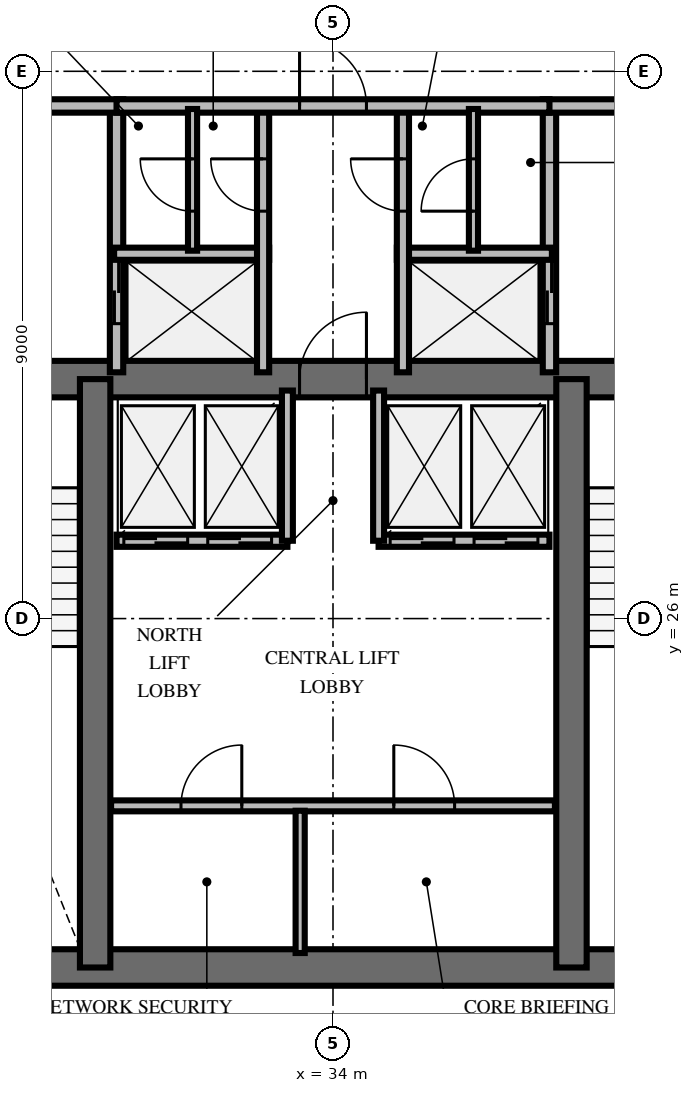
"""IFC4 building model, lengths in metres.
Left out: names, types, materials, properties, quantities, classifications, styles, units other than length and angle.
Written with IfcOpenShell. Run it as: python <this file> out.ifc"""

import sys

from ifc_helpers import new_model, si_unit, direction, frame, frame_2d, origin, place, context, subcontext, project, spatial, rectangle, extrude, element, fill, save


model = new_model("IFC4")
c1 = context("Model", 3, precision=1e-05, world=origin(), true_north=direction((0.0, 1.0)))
c2 = subcontext(c1, "Body", "Model", "MODEL_VIEW")
j1 = project(units=[si_unit("LENGTHUNIT", "METRE"), si_unit("PLANEANGLEUNIT", "RADIAN")], contexts=[c1])
p1 = place(None, origin())
s1 = spatial("IfcSite", under=j1, at=p1, CompositionType="ELEMENT")
p2 = place(p1, origin())
s2 = spatial("IfcBuilding", under=s1, at=p2, CompositionType="ELEMENT")
p3 = place(p2, frame((0.0, 0.0, 248.4)))
s3 = spatial("IfcBuildingStorey", under=s2, at=p3, CompositionType="ELEMENT", Elevation=248.4)
p4 = place(p3, frame((26.222, 20.262, 0.0), z_axis=(0.0, 0.0, 1.0), x_axis=(1.0, 0.0, 0.0)))
e1 = element("IfcWall", 1, at=p4, inside=s3, PredefinedType="SHEAR", context=c2, shape_type="SweptSolid", body=[
    extrude(rectangle(XDim=15.566, YDim=0.6, at=frame_2d((7.783, 0.0))), origin(), (0.0, 0.0, 1.0), 3.6),
])
p5 = place(p3, frame((26.222, 29.938, 0.0), z_axis=(0.0, 0.0, 1.0), x_axis=(1.0, 0.0, 0.0)))
e2 = element("IfcWall", 2, at=p5, inside=s3, PredefinedType="SHEAR", context=c2, shape_type="SweptSolid", body=[
    extrude(rectangle(XDim=15.566, YDim=0.6, at=frame_2d((7.783, 0.0))), origin(), (0.0, 0.0, 1.0), 3.6),
])
p6 = place(p5, frame((0.728, 0.0, 0.0)))
e3 = element("IfcOpeningElement", 3, at=p6, cuts=e2, PredefinedType="OPENING", context=c2, shape_type="SweptSolid", body=[
    extrude(rectangle(XDim=1.05, YDim=2.15, at=frame_2d((0.525, 1.075))), frame((0.0, 0.31, 0.0), z_axis=(0.0, -1.0, 0.0), x_axis=(1.0, 0.0, 0.0)), (0.0, 0.0, 1.0), 0.62),
])
p7 = place(p5, frame((13.778, 0.0, 0.0)))
e4 = element("IfcOpeningElement", 4, at=p7, cuts=e2, PredefinedType="OPENING", context=c2, shape_type="SweptSolid", body=[
    extrude(rectangle(XDim=1.05, YDim=2.15, at=frame_2d((0.525, 1.075))), frame((0.0, 0.31, 0.0), z_axis=(0.0, -1.0, 0.0), x_axis=(1.0, 0.0, 0.0)), (0.0, 0.0, 1.0), 0.62),
])
p8 = place(p5, frame((7.228, 0.0, 0.0)))
e5 = element("IfcOpeningElement", 5, at=p8, cuts=e2, PredefinedType="OPENING", context=c2, shape_type="SweptSolid", body=[
    extrude(rectangle(XDim=1.1, YDim=2.15, at=frame_2d((0.55, 1.075))), frame((0.0, 0.31, 0.0), z_axis=(0.0, -1.0, 0.0), x_axis=(1.0, 0.0, 0.0)), (0.0, 0.0, 1.0), 0.62),
])
for number, where, z_axis, x_axis in (
    (6, (30.088, 20.262, 0.0), (0.0, 0.0, 1.0), (0.0, 1.0, 0.0)),
    (7, (37.922, 20.262, 0.0), (0.0, 0.0, 1.0), (0.0, 1.0, 0.0)),
):
    element("IfcWall", number, at=place(p3, frame(where, z_axis=z_axis, x_axis=x_axis)), inside=s3, PredefinedType="SHEAR", context=c2, shape_type="SweptSolid", body=[
        extrude(rectangle(XDim=9.676, YDim=0.5, at=frame_2d((4.838, 0.0))), origin(), (0.0, 0.0, 1.0), 3.6),
    ])
p9 = place(p3, frame((30.44, 30.05, 0.0), z_axis=(0.0, 0.0, 1.0), x_axis=(0.0, 1.0, 0.0)))
e8 = element("IfcWall", 8, at=p9, inside=s3, PredefinedType="SOLIDWALL", context=c2, shape_type="SweptSolid", body=[
    extrude(rectangle(XDim=4.38, YDim=0.22, at=frame_2d((2.19, 0.0))), origin(), (0.0, 0.0, 1.0), 2.46),
])
p10 = place(p9, frame((0.8, 0.0, 0.0)))
e9 = element("IfcOpeningElement", 9, at=p10, cuts=e8, PredefinedType="OPENING", context=c2, shape_type="SweptSolid", body=[
    extrude(rectangle(XDim=1.05, YDim=2.1, at=frame_2d((0.525, 1.05))), frame((0.0, 0.12, 0.0), z_axis=(0.0, -1.0, 0.0), x_axis=(1.0, 0.0, 0.0)), (0.0, 0.0, 1.0), 0.24),
])
p11 = place(p3, frame((26.24, 34.43, 0.0), z_axis=(0.0, 0.0, 1.0), x_axis=(1.0, 0.0, 0.0)))
e10 = element("IfcWall", 10, at=p11, inside=s3, PredefinedType="SOLIDWALL", context=c2, shape_type="SweptSolid", body=[
    extrude(rectangle(XDim=4.31, YDim=0.22, at=frame_2d((2.155, 0.0))), origin(), (0.0, 0.0, 1.0), 2.46),
])
p12 = place(p11, frame((1.6, 0.0, 0.0)))
e11 = element("IfcOpeningElement", 11, at=p12, cuts=e10, PredefinedType="OPENING", context=c2, shape_type="SweptSolid", body=[
    extrude(rectangle(XDim=1.1, YDim=2.15, at=frame_2d((0.55, 1.075))), frame((0.0, 0.12, 0.0), z_axis=(0.0, -1.0, 0.0), x_axis=(1.0, 0.0, 0.0)), (0.0, 0.0, 1.0), 0.24),
])
p13 = place(p3, frame((30.4, 32.0, 0.0), z_axis=(0.0, 0.0, 1.0), x_axis=(1.0, 0.0, 0.0)))
e12 = element("IfcWall", 12, at=p13, inside=s3, PredefinedType="SOLIDWALL", context=c2, shape_type="SweptSolid", body=[
    extrude(rectangle(XDim=2.55, YDim=0.2, at=frame_2d((1.275, 0.0))), origin(), (0.0, 0.0, 1.0), 2.46),
])
p14 = place(p3, frame((32.85, 30.05, 0.0), z_axis=(0.0, 0.0, 1.0), x_axis=(0.0, 1.0, 0.0)))
e13 = element("IfcWall", 13, at=p14, inside=s3, PredefinedType="SOLIDWALL", context=c2, shape_type="SweptSolid", body=[
    extrude(rectangle(XDim=4.38, YDim=0.2, at=frame_2d((2.19, 0.0))), origin(), (0.0, 0.0, 1.0), 2.46),
])
p15 = place(p14, frame((2.65, 0.0, 0.0)))
e14 = element("IfcOpeningElement", 14, at=p15, cuts=e13, PredefinedType="OPENING", context=c2, shape_type="SweptSolid", body=[
    extrude(rectangle(XDim=0.86, YDim=2.05, at=frame_2d((0.43, 1.025))), frame((0.0, 0.11, 0.0), z_axis=(0.0, -1.0, 0.0), x_axis=(1.0, 0.0, 0.0)), (0.0, 0.0, 1.0), 0.22),
])
p16 = place(p3, frame((37.56, 30.05, 0.0), z_axis=(0.0, 0.0, 1.0), x_axis=(0.0, 1.0, 0.0)))
e15 = element("IfcWall", 15, at=p16, inside=s3, PredefinedType="SOLIDWALL", context=c2, shape_type="SweptSolid", body=[
    extrude(rectangle(XDim=4.38, YDim=0.22, at=frame_2d((2.19, 0.0))), origin(), (0.0, 0.0, 1.0), 2.46),
])
p17 = place(p16, frame((0.8, 0.0, 0.0)))
e16 = element("IfcOpeningElement", 16, at=p17, cuts=e15, PredefinedType="OPENING", context=c2, shape_type="SweptSolid", body=[
    extrude(rectangle(XDim=1.05, YDim=2.1, at=frame_2d((0.525, 1.05))), frame((0.0, 0.12, 0.0), z_axis=(0.0, -1.0, 0.0), x_axis=(1.0, 0.0, 0.0)), (0.0, 0.0, 1.0), 0.24),
])
p18 = place(p3, frame((37.45, 34.43, 0.0), z_axis=(0.0, 0.0, 1.0), x_axis=(1.0, 0.0, 0.0)))
e17 = element("IfcWall", 17, at=p18, inside=s3, PredefinedType="SOLIDWALL", context=c2, shape_type="SweptSolid", body=[
    extrude(rectangle(XDim=4.31, YDim=0.22, at=frame_2d((2.155, 0.0))), origin(), (0.0, 0.0, 1.0), 2.46),
])
p19 = place(p18, frame((1.6, 0.0, 0.0)))
e18 = element("IfcOpeningElement", 18, at=p19, cuts=e17, PredefinedType="OPENING", context=c2, shape_type="SweptSolid", body=[
    extrude(rectangle(XDim=1.1, YDim=2.15, at=frame_2d((0.55, 1.075))), frame((0.0, 0.12, 0.0), z_axis=(0.0, -1.0, 0.0), x_axis=(1.0, 0.0, 0.0)), (0.0, 0.0, 1.0), 0.24),
])
p20 = place(p3, frame((35.05, 32.0, 0.0), z_axis=(0.0, 0.0, 1.0), x_axis=(1.0, 0.0, 0.0)))
e19 = element("IfcWall", 19, at=p20, inside=s3, PredefinedType="SOLIDWALL", context=c2, shape_type="SweptSolid", body=[
    extrude(rectangle(XDim=2.55, YDim=0.2, at=frame_2d((1.275, 0.0))), origin(), (0.0, 0.0, 1.0), 2.46),
])
p21 = place(p3, frame((35.15, 30.05, 0.0), z_axis=(0.0, 0.0, 1.0), x_axis=(0.0, 1.0, 0.0)))
e20 = element("IfcWall", 20, at=p21, inside=s3, PredefinedType="SOLIDWALL", context=c2, shape_type="SweptSolid", body=[
    extrude(rectangle(XDim=4.38, YDim=0.2, at=frame_2d((2.19, 0.0))), origin(), (0.0, 0.0, 1.0), 2.46),
])
p22 = place(p21, frame((2.65, 0.0, 0.0)))
e21 = element("IfcOpeningElement", 21, at=p22, cuts=e20, PredefinedType="OPENING", context=c2, shape_type="SweptSolid", body=[
    extrude(rectangle(XDim=0.86, YDim=2.05, at=frame_2d((0.43, 1.025))), frame((0.0, 0.11, 0.0), z_axis=(0.0, -1.0, 0.0), x_axis=(1.0, 0.0, 0.0)), (0.0, 0.0, 1.0), 0.22),
])
p23 = place(p3, frame((30.44, 34.43, 0.0), z_axis=(0.0, 0.0, 1.0), x_axis=(1.0, 0.0, 0.0)))
e22 = element("IfcWall", 22, at=p23, inside=s3, PredefinedType="SOLIDWALL", context=c2, shape_type="SweptSolid", body=[
    extrude(rectangle(XDim=7.12, YDim=0.22, at=frame_2d((3.56, 0.0))), origin(), (0.0, 0.0, 1.0), 2.46),
])
p24 = place(p23, frame((3.01, 0.0, 0.0)))
e23 = element("IfcOpeningElement", 23, at=p24, cuts=e22, PredefinedType="OPENING", context=c2, shape_type="SweptSolid", body=[
    extrude(rectangle(XDim=1.1, YDim=2.15, at=frame_2d((0.55, 1.075))), frame((0.0, 0.12, 0.0), z_axis=(0.0, -1.0, 0.0), x_axis=(1.0, 0.0, 0.0)), (0.0, 0.0, 1.0), 0.24),
])
p25 = place(p3, frame((31.69, 32.05, 0.0), z_axis=(0.0, 0.0, 1.0), x_axis=(0.0, 1.0, 0.0)))
e24 = element("IfcWall", 24, at=p25, inside=s3, PredefinedType="PARTITIONING", context=c2, shape_type="SweptSolid", body=[
    extrude(rectangle(XDim=2.33, YDim=0.15, at=frame_2d((1.165, 0.0))), origin(), (0.0, 0.0, 1.0), 2.46),
])
p26 = place(p25, frame((0.65, 0.0, 0.0)))
e25 = element("IfcOpeningElement", 25, at=p26, cuts=e24, PredefinedType="OPENING", context=c2, shape_type="SweptSolid", body=[
    extrude(rectangle(XDim=0.86, YDim=2.05, at=frame_2d((0.43, 1.025))), frame((0.0, 0.085, 0.0), z_axis=(0.0, -1.0, 0.0), x_axis=(1.0, 0.0, 0.0)), (0.0, 0.0, 1.0), 0.17),
])
p27 = place(p3, frame((36.31, 32.05, 0.0), z_axis=(0.0, 0.0, 1.0), x_axis=(0.0, 1.0, 0.0)))
e26 = element("IfcWall", 26, at=p27, inside=s3, PredefinedType="PARTITIONING", context=c2, shape_type="SweptSolid", body=[
    extrude(rectangle(XDim=2.33, YDim=0.15, at=frame_2d((1.165, 0.0))), origin(), (0.0, 0.0, 1.0), 2.46),
])
p28 = place(p27, frame((0.65, 0.0, 0.0)))
e27 = element("IfcOpeningElement", 27, at=p28, cuts=e26, PredefinedType="OPENING", context=c2, shape_type="SweptSolid", body=[
    extrude(rectangle(XDim=0.86, YDim=2.05, at=frame_2d((0.43, 1.025))), frame((0.0, 0.085, 0.0), z_axis=(0.0, -1.0, 0.0), x_axis=(1.0, 0.0, 0.0)), (0.0, 0.0, 1.0), 0.17),
])
p29 = place(p3, frame((30.35, 22.92, 0.0), z_axis=(0.0, 0.0, 1.0), x_axis=(1.0, 0.0, 0.0)))
e28 = element("IfcWall", 28, at=p29, inside=s3, PredefinedType="PARTITIONING", context=c2, shape_type="SweptSolid", body=[
    extrude(rectangle(XDim=7.3, YDim=0.18, at=frame_2d((3.65, 0.0))), origin(), (0.0, 0.0, 1.0), 2.46),
])
p30 = place(p29, frame((1.15, 0.0, 0.0)))
e29 = element("IfcOpeningElement", 29, at=p30, cuts=e28, PredefinedType="OPENING", context=c2, shape_type="SweptSolid", body=[
    extrude(rectangle(XDim=1.0, YDim=2.15, at=frame_2d((0.5, 1.075))), frame((0.0, 0.1, 0.0), z_axis=(0.0, -1.0, 0.0), x_axis=(1.0, 0.0, 0.0)), (0.0, 0.0, 1.0), 0.2),
])
p31 = place(p29, frame((4.65, 0.0, 0.0)))
e30 = element("IfcOpeningElement", 30, at=p31, cuts=e28, PredefinedType="OPENING", context=c2, shape_type="SweptSolid", body=[
    extrude(rectangle(XDim=1.0, YDim=2.15, at=frame_2d((0.5, 1.075))), frame((0.0, 0.1, 0.0), z_axis=(0.0, -1.0, 0.0), x_axis=(1.0, 0.0, 0.0)), (0.0, 0.0, 1.0), 0.2),
])
p32 = place(p3, frame((33.46, 20.5, 0.0), z_axis=(0.0, 0.0, 1.0), x_axis=(0.0, 1.0, 0.0)))
e31 = element("IfcWall", 31, at=p32, inside=s3, PredefinedType="PARTITIONING", context=c2, shape_type="SweptSolid", body=[
    extrude(rectangle(XDim=2.34, YDim=0.15, at=frame_2d((1.17, 0.0))), origin(), (0.0, 0.0, 1.0), 2.46),
])
p33 = place(p3, frame((30.44, 27.28, 0.0), z_axis=(0.0, 0.0, 1.0), x_axis=(1.0, 0.0, 0.0)))
e32 = element("IfcWall", 32, at=p33, inside=s3, PredefinedType="SOLIDWALL", context=c2, shape_type="SweptSolid", body=[
    extrude(rectangle(XDim=2.81, YDim=0.2, at=frame_2d((1.405, 0.0))), origin(), (0.0, 0.0, 1.0), 2.46),
])
p34 = place(p33, frame((0.12, 0.0, 0.0)))
e33 = element("IfcOpeningElement", 33, at=p34, cuts=e32, PredefinedType="OPENING", context=c2, shape_type="SweptSolid", body=[
    extrude(rectangle(XDim=1.05, YDim=2.1, at=frame_2d((0.525, 1.05))), frame((0.0, 0.11, 0.0), z_axis=(0.0, -1.0, 0.0), x_axis=(1.0, 0.0, 0.0)), (0.0, 0.0, 1.0), 0.22),
])
p35 = place(p33, frame((1.5, 0.0, 0.0)))
e34 = element("IfcOpeningElement", 34, at=p35, cuts=e32, PredefinedType="OPENING", context=c2, shape_type="SweptSolid", body=[
    extrude(rectangle(XDim=1.05, YDim=2.1, at=frame_2d((0.525, 1.05))), frame((0.0, 0.11, 0.0), z_axis=(0.0, -1.0, 0.0), x_axis=(1.0, 0.0, 0.0)), (0.0, 0.0, 1.0), 0.22),
])
p36 = place(p3, frame((33.25, 27.28, 0.0), z_axis=(0.0, 0.0, 1.0), x_axis=(0.0, 1.0, 0.0)))
e35 = element("IfcWall", 35, at=p36, inside=s3, PredefinedType="SOLIDWALL", context=c2, shape_type="SweptSolid", body=[
    extrude(rectangle(XDim=2.47, YDim=0.18, at=frame_2d((1.235, 0.0))), origin(), (0.0, 0.0, 1.0), 2.46),
])
p37 = place(p3, frame((34.75, 27.28, 0.0), z_axis=(0.0, 0.0, 1.0), x_axis=(1.0, 0.0, 0.0)))
e36 = element("IfcWall", 36, at=p37, inside=s3, PredefinedType="SOLIDWALL", context=c2, shape_type="SweptSolid", body=[
    extrude(rectangle(XDim=2.81, YDim=0.2, at=frame_2d((1.405, 0.0))), origin(), (0.0, 0.0, 1.0), 2.46),
])
p38 = place(p37, frame((0.19, 0.0, 0.0)))
e37 = element("IfcOpeningElement", 37, at=p38, cuts=e36, PredefinedType="OPENING", context=c2, shape_type="SweptSolid", body=[
    extrude(rectangle(XDim=1.05, YDim=2.1, at=frame_2d((0.525, 1.05))), frame((0.0, 0.11, 0.0), z_axis=(0.0, -1.0, 0.0), x_axis=(1.0, 0.0, 0.0)), (0.0, 0.0, 1.0), 0.22),
])
p39 = place(p37, frame((1.57, 0.0, 0.0)))
e38 = element("IfcOpeningElement", 38, at=p39, cuts=e36, PredefinedType="OPENING", context=c2, shape_type="SweptSolid", body=[
    extrude(rectangle(XDim=1.05, YDim=2.1, at=frame_2d((0.525, 1.05))), frame((0.0, 0.11, 0.0), z_axis=(0.0, -1.0, 0.0), x_axis=(1.0, 0.0, 0.0)), (0.0, 0.0, 1.0), 0.22),
])
p40 = place(p3, frame((34.75, 27.28, 0.0), z_axis=(0.0, 0.0, 1.0), x_axis=(0.0, 1.0, 0.0)))
e39 = element("IfcWall", 39, at=p40, inside=s3, PredefinedType="SOLIDWALL", context=c2, shape_type="SweptSolid", body=[
    extrude(rectangle(XDim=2.47, YDim=0.18, at=frame_2d((1.235, 0.0))), origin(), (0.0, 0.0, 1.0), 2.46),
])
p41 = place(p3, frame((27.5, 35.219, 0.0), z_axis=(0.0, 0.0, 1.0), x_axis=(0.953228121756, 0.302251795518, 0.0)))
e40 = element("IfcWall", 40, at=p41, inside=s3, PredefinedType="PARTITIONING", context=c2, shape_type="SweptSolid", body=[
    extrude(rectangle(XDim=6.819, YDim=0.18, at=frame_2d((3.409, 0.0))), origin(), (0.0, 0.0, 1.0), 2.46),
])
p42 = place(p41, frame((2.86, 0.0, 0.0)))
e41 = element("IfcOpeningElement", 41, at=p42, cuts=e40, PredefinedType="OPENING", context=c2, shape_type="SweptSolid", body=[
    extrude(rectangle(XDim=1.1, YDim=2.15, at=frame_2d((0.55, 1.075))), frame((0.0, 0.1, 0.0), z_axis=(0.0, -1.0, 0.0), x_axis=(1.0, 0.0, 0.0)), (0.0, 0.0, 1.0), 0.2),
])
p43 = place(p3, frame((34.0, 37.28, 0.0), z_axis=(0.0, 0.0, 1.0), x_axis=(0.953228121756, -0.302251795518, 0.0)))
e42 = element("IfcWall", 42, at=p43, inside=s3, PredefinedType="PARTITIONING", context=c2, shape_type="SweptSolid", body=[
    extrude(rectangle(XDim=6.819, YDim=0.18, at=frame_2d((3.409, 0.0))), origin(), (0.0, 0.0, 1.0), 2.46),
])
p44 = place(p43, frame((2.86, 0.0, 0.0)))
e43 = element("IfcOpeningElement", 43, at=p44, cuts=e42, PredefinedType="OPENING", context=c2, shape_type="SweptSolid", body=[
    extrude(rectangle(XDim=1.1, YDim=2.15, at=frame_2d((0.55, 1.075))), frame((0.0, 0.1, 0.0), z_axis=(0.0, -1.0, 0.0), x_axis=(1.0, 0.0, 0.0)), (0.0, 0.0, 1.0), 0.2),
])
p45 = place(p8, origin())
e44 = element("IfcDoor", 44, at=p45, inside=s3, OperationType="SINGLE_SWING_RIGHT", PredefinedType="DOOR", context=c2, shape_type="SweptSolid", body=[
    extrude(rectangle(XDim=1.1, YDim=2.15, at=frame_2d((0.55, 1.075))), frame((0.0, 0.025, 0.0), z_axis=(0.0, -1.0, 0.0), x_axis=(1.0, 0.0, 0.0)), (0.0, 0.0, 1.0), 0.05),
])
fill(e5, e44)
p46 = place(p10, origin())
e45 = element("IfcDoor", 45, at=p46, inside=s3, OperationType="DOUBLE_DOOR_SLIDING", PredefinedType="USERDEFINED", context=c2, shape_type="SweptSolid", body=[
    extrude(rectangle(XDim=1.05, YDim=2.1, at=frame_2d((0.525, 1.05))), frame((0.0, 0.025, 0.0), z_axis=(0.0, -1.0, 0.0), x_axis=(1.0, 0.0, 0.0)), (0.0, 0.0, 1.0), 0.05),
])
fill(e9, e45)
p47 = place(p15, origin())
e46 = element("IfcDoor", 46, at=p47, inside=s3, OperationType="SINGLE_SWING_RIGHT", PredefinedType="TRAPDOOR", context=c2, shape_type="SweptSolid", body=[
    extrude(rectangle(XDim=0.86, YDim=2.05, at=frame_2d((0.43, 1.025))), frame((0.0, 0.025, 0.0), z_axis=(0.0, -1.0, 0.0), x_axis=(1.0, 0.0, 0.0)), (0.0, 0.0, 1.0), 0.05),
])
fill(e14, e46)
p48 = place(p17, origin())
e47 = element("IfcDoor", 47, at=p48, inside=s3, OperationType="DOUBLE_DOOR_SLIDING", PredefinedType="USERDEFINED", context=c2, shape_type="SweptSolid", body=[
    extrude(rectangle(XDim=1.05, YDim=2.1, at=frame_2d((0.525, 1.05))), frame((0.0, 0.025, 0.0), z_axis=(0.0, -1.0, 0.0), x_axis=(1.0, 0.0, 0.0)), (0.0, 0.0, 1.0), 0.05),
])
fill(e16, e47)
p49 = place(p22, origin())
e48 = element("IfcDoor", 48, at=p49, inside=s3, OperationType="SINGLE_SWING_RIGHT", PredefinedType="TRAPDOOR", context=c2, shape_type="SweptSolid", body=[
    extrude(rectangle(XDim=0.86, YDim=2.05, at=frame_2d((0.43, 1.025))), frame((0.0, 0.025, 0.0), z_axis=(0.0, -1.0, 0.0), x_axis=(1.0, 0.0, 0.0)), (0.0, 0.0, 1.0), 0.05),
])
fill(e21, e48)
p50 = place(p24, origin())
e49 = element("IfcDoor", 49, at=p50, inside=s3, OperationType="SINGLE_SWING_LEFT", PredefinedType="DOOR", context=c2, shape_type="SweptSolid", body=[
    extrude(rectangle(XDim=1.1, YDim=2.15, at=frame_2d((0.55, 1.075))), frame((0.0, 0.025, 0.0), z_axis=(0.0, -1.0, 0.0), x_axis=(1.0, 0.0, 0.0)), (0.0, 0.0, 1.0), 0.05),
])
fill(e23, e49)
p51 = place(p26, origin())
e50 = element("IfcDoor", 50, at=p51, inside=s3, OperationType="SINGLE_SWING_RIGHT", PredefinedType="TRAPDOOR", context=c2, shape_type="SweptSolid", body=[
    extrude(rectangle(XDim=0.86, YDim=2.05, at=frame_2d((0.43, 1.025))), frame((0.0, 0.025, 0.0), z_axis=(0.0, -1.0, 0.0), x_axis=(1.0, 0.0, 0.0)), (0.0, 0.0, 1.0), 0.05),
])
fill(e25, e50)
p52 = place(p28, origin())
e51 = element("IfcDoor", 51, at=p52, inside=s3, OperationType="SINGLE_SWING_LEFT", PredefinedType="TRAPDOOR", context=c2, shape_type="SweptSolid", body=[
    extrude(rectangle(XDim=0.86, YDim=2.05, at=frame_2d((0.43, 1.025))), frame((0.0, 0.025, 0.0), z_axis=(0.0, -1.0, 0.0), x_axis=(1.0, 0.0, 0.0)), (0.0, 0.0, 1.0), 0.05),
])
fill(e27, e51)
p53 = place(p30, origin())
e52 = element("IfcDoor", 52, at=p53, inside=s3, OperationType="SINGLE_SWING_RIGHT", PredefinedType="DOOR", context=c2, shape_type="SweptSolid", body=[
    extrude(rectangle(XDim=1.0, YDim=2.15, at=frame_2d((0.5, 1.075))), frame((0.0, 0.025, 0.0), z_axis=(0.0, -1.0, 0.0), x_axis=(1.0, 0.0, 0.0)), (0.0, 0.0, 1.0), 0.05),
])
fill(e29, e52)
p54 = place(p31, origin())
e53 = element("IfcDoor", 53, at=p54, inside=s3, OperationType="SINGLE_SWING_LEFT", PredefinedType="DOOR", context=c2, shape_type="SweptSolid", body=[
    extrude(rectangle(XDim=1.0, YDim=2.15, at=frame_2d((0.5, 1.075))), frame((0.0, 0.025, 0.0), z_axis=(0.0, -1.0, 0.0), x_axis=(1.0, 0.0, 0.0)), (0.0, 0.0, 1.0), 0.05),
])
fill(e30, e53)
p55 = place(p34, origin())
e54 = element("IfcDoor", 54, at=p55, inside=s3, OperationType="DOUBLE_DOOR_SLIDING", PredefinedType="USERDEFINED", context=c2, shape_type="SweptSolid", body=[
    extrude(rectangle(XDim=1.05, YDim=2.1, at=frame_2d((0.525, 1.05))), frame((0.0, 0.025, 0.0), z_axis=(0.0, -1.0, 0.0), x_axis=(1.0, 0.0, 0.0)), (0.0, 0.0, 1.0), 0.05),
])
fill(e33, e54)
p56 = place(p35, origin())
e55 = element("IfcDoor", 55, at=p56, inside=s3, OperationType="DOUBLE_DOOR_SLIDING", PredefinedType="USERDEFINED", context=c2, shape_type="SweptSolid", body=[
    extrude(rectangle(XDim=1.05, YDim=2.1, at=frame_2d((0.525, 1.05))), frame((0.0, 0.025, 0.0), z_axis=(0.0, -1.0, 0.0), x_axis=(1.0, 0.0, 0.0)), (0.0, 0.0, 1.0), 0.05),
])
fill(e34, e55)
p57 = place(p38, origin())
e56 = element("IfcDoor", 56, at=p57, inside=s3, OperationType="DOUBLE_DOOR_SLIDING", PredefinedType="USERDEFINED", context=c2, shape_type="SweptSolid", body=[
    extrude(rectangle(XDim=1.05, YDim=2.1, at=frame_2d((0.525, 1.05))), frame((0.0, 0.025, 0.0), z_axis=(0.0, -1.0, 0.0), x_axis=(1.0, 0.0, 0.0)), (0.0, 0.0, 1.0), 0.05),
])
fill(e37, e56)
p58 = place(p39, origin())
e57 = element("IfcDoor", 57, at=p58, inside=s3, OperationType="DOUBLE_DOOR_SLIDING", PredefinedType="USERDEFINED", context=c2, shape_type="SweptSolid", body=[
    extrude(rectangle(XDim=1.05, YDim=2.1, at=frame_2d((0.525, 1.05))), frame((0.0, 0.025, 0.0), z_axis=(0.0, -1.0, 0.0), x_axis=(1.0, 0.0, 0.0)), (0.0, 0.0, 1.0), 0.05),
])
fill(e38, e57)
save(model, sys.argv[1])
